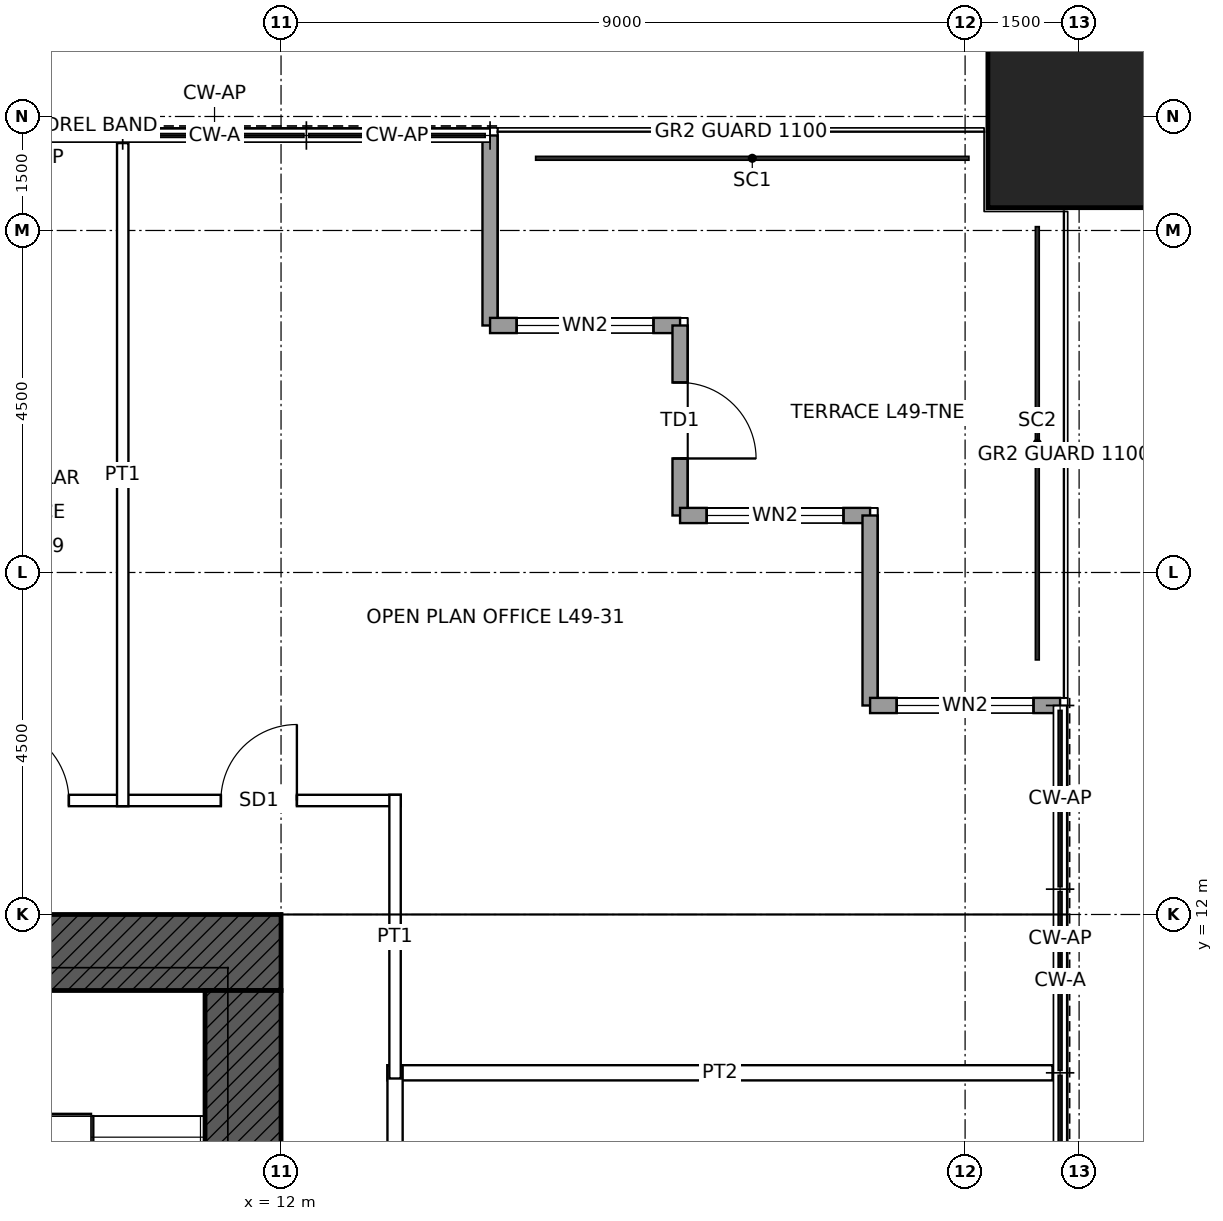
"""IFC4 building model, lengths in metres.
Left out: names, types, materials, properties, quantities, classifications, styles, units other than length and angle.
Written with IfcOpenShell. Run it as: python <this file> out.ifc"""

import sys

from ifc_helpers import new_model, si_unit, direction, frame, frame_2d, origin, origin_2d, place, context, subcontext, project, spatial, rectangle, hollow_rectangle, extrude, element, fill, save


model = new_model("IFC4")
c1 = context("Model", 3, precision=1e-05, world=origin(), true_north=direction((0.0, 1.0)))
c2 = subcontext(c1, "Body", "Model", "MODEL_VIEW")
j1 = project(units=[si_unit("LENGTHUNIT", "METRE"), si_unit("PLANEANGLEUNIT", "RADIAN")], contexts=[c1])
p1 = place(None, origin())
s1 = spatial("IfcSite", under=j1, at=p1, CompositionType="ELEMENT")
p2 = place(p1, origin())
s2 = spatial("IfcBuilding", under=s1, at=p2, CompositionType="ELEMENT")
p3 = place(p2, frame((0.0, 0.0, 229.9)))
s3 = spatial("IfcBuildingStorey", under=s2, at=p3, CompositionType="ELEMENT", Elevation=229.9)
p4 = place(p3, frame((22.5, 22.5, 0.0), z_axis=(0.0, 0.0, 1.0), x_axis=(1.0, 0.0, 0.0)))
e1 = element("IfcColumn", 1, at=p4, inside=s3, PredefinedType="COLUMN", context=c2, shape_type="SweptSolid", body=[
    extrude(hollow_rectangle(XDim=2.4, YDim=2.4, WallThickness=0.12, at=origin_2d()), origin(), (0.0, 0.0, 1.0), 4.0),
])
p5 = place(p3, frame((-12.0, 11.5, 0.0), z_axis=(0.0, 0.0, 1.0), x_axis=(1.0, 0.0, 0.0)))
e2 = element("IfcWall", 2, at=p5, inside=s3, PredefinedType="SHEAR", context=c2, shape_type="SweptSolid", body=[
    extrude(rectangle(XDim=24.0, YDim=1.0, at=frame_2d((12.0, 0.0))), origin(), (0.0, 0.0, 1.0), 4.0),
])
p6 = place(p5, frame((6.25, 0.0, 0.0)))
e3 = element("IfcOpeningElement", 3, at=p6, cuts=e2, PredefinedType="OPENING", context=c2, shape_type="SweptSolid", body=[
    extrude(rectangle(XDim=1.0, YDim=2.4, at=frame_2d((0.5, 1.2))), frame((0.0, 0.51, 0.0), z_axis=(0.0, -1.0, 0.0), x_axis=(1.0, 0.0, 0.0)), (0.0, 0.0, 1.0), 1.02),
])
p7 = place(p5, frame((16.75, 0.0, 0.0)))
e4 = element("IfcOpeningElement", 4, at=p7, cuts=e2, PredefinedType="OPENING", context=c2, shape_type="SweptSolid", body=[
    extrude(rectangle(XDim=1.0, YDim=2.4, at=frame_2d((0.5, 1.2))), frame((0.0, 0.51, 0.0), z_axis=(0.0, -1.0, 0.0), x_axis=(1.0, 0.0, 0.0)), (0.0, 0.0, 1.0), 1.02),
])
p8 = place(p3, frame((11.5, 11.0, 0.0), z_axis=(0.0, 0.0, 1.0), x_axis=(0.0, -1.0, 0.0)))
e5 = element("IfcWall", 5, at=p8, inside=s3, PredefinedType="SHEAR", context=c2, shape_type="SweptSolid", body=[
    extrude(rectangle(XDim=22.0, YDim=1.0, at=frame_2d((11.0, 0.0))), origin(), (0.0, 0.0, 1.0), 4.0),
])
p9 = place(p8, frame((10.5, 0.0, 0.0)))
e6 = element("IfcOpeningElement", 6, at=p9, cuts=e5, PredefinedType="OPENING", context=c2, shape_type="SweptSolid", body=[
    extrude(rectangle(XDim=1.0, YDim=2.4, at=frame_2d((0.5, 1.2))), frame((0.0, 0.51, 0.0), z_axis=(0.0, -1.0, 0.0), x_axis=(1.0, 0.0, 0.0)), (0.0, 0.0, 1.0), 1.02),
])
p10 = place(p3, frame((14.75, 22.25, 0.0), z_axis=(0.0, 0.0, 1.0), x_axis=(0.0, -1.0, 0.0)))
e7 = element("IfcWall", 7, at=p10, inside=s3, PredefinedType="SOLIDWALL", context=c2, shape_type="SweptSolid", body=[
    extrude(rectangle(XDim=2.5, YDim=0.2, at=frame_2d((1.25, 0.0))), origin(), (0.0, 0.0, 1.0), 3.85),
])
p11 = place(p3, frame((14.75, 19.75, 0.0), z_axis=(0.0, 0.0, 1.0), x_axis=(1.0, 0.0, 0.0)))
e8 = element("IfcWall", 8, at=p11, inside=s3, PredefinedType="SOLIDWALL", context=c2, shape_type="SweptSolid", body=[
    extrude(rectangle(XDim=2.5, YDim=0.2, at=frame_2d((1.25, 0.0))), origin(), (0.0, 0.0, 1.0), 3.85),
])
p12 = place(p11, frame((0.35, 0.0, 0.3)))
e9 = element("IfcOpeningElement", 9, at=p12, cuts=e8, PredefinedType="OPENING", context=c2, shape_type="SweptSolid", body=[
    extrude(rectangle(XDim=1.8, YDim=2.4, at=frame_2d((0.9, 1.2))), frame((0.0, 0.11, 0.0), z_axis=(0.0, -1.0, 0.0), x_axis=(1.0, 0.0, 0.0)), (0.0, 0.0, 1.0), 0.22),
])
p13 = place(p3, frame((17.25, 19.75, 0.0), z_axis=(0.0, 0.0, 1.0), x_axis=(0.0, -1.0, 0.0)))
e10 = element("IfcWall", 10, at=p13, inside=s3, PredefinedType="SOLIDWALL", context=c2, shape_type="SweptSolid", body=[
    extrude(rectangle(XDim=2.5, YDim=0.2, at=frame_2d((1.25, 0.0))), origin(), (0.0, 0.0, 1.0), 3.85),
])
p14 = place(p13, frame((0.75, 0.0, 0.0)))
e11 = element("IfcOpeningElement", 11, at=p14, cuts=e10, PredefinedType="OPENING", context=c2, shape_type="SweptSolid", body=[
    extrude(rectangle(XDim=1.0, YDim=2.4, at=frame_2d((0.5, 1.2))), frame((0.0, 0.11, 0.0), z_axis=(0.0, -1.0, 0.0), x_axis=(1.0, 0.0, 0.0)), (0.0, 0.0, 1.0), 0.22),
])
p15 = place(p3, frame((17.25, 17.25, 0.0), z_axis=(0.0, 0.0, 1.0), x_axis=(1.0, 0.0, 0.0)))
e12 = element("IfcWall", 12, at=p15, inside=s3, PredefinedType="SOLIDWALL", context=c2, shape_type="SweptSolid", body=[
    extrude(rectangle(XDim=2.5, YDim=0.2, at=frame_2d((1.25, 0.0))), origin(), (0.0, 0.0, 1.0), 3.85),
])
p16 = place(p15, frame((0.35, 0.0, 0.3)))
e13 = element("IfcOpeningElement", 13, at=p16, cuts=e12, PredefinedType="OPENING", context=c2, shape_type="SweptSolid", body=[
    extrude(rectangle(XDim=1.8, YDim=2.4, at=frame_2d((0.9, 1.2))), frame((0.0, 0.11, 0.0), z_axis=(0.0, -1.0, 0.0), x_axis=(1.0, 0.0, 0.0)), (0.0, 0.0, 1.0), 0.22),
])
p17 = place(p3, frame((19.75, 17.25, 0.0), z_axis=(0.0, 0.0, 1.0), x_axis=(0.0, -1.0, 0.0)))
e14 = element("IfcWall", 14, at=p17, inside=s3, PredefinedType="SOLIDWALL", context=c2, shape_type="SweptSolid", body=[
    extrude(rectangle(XDim=2.5, YDim=0.2, at=frame_2d((1.25, 0.0))), origin(), (0.0, 0.0, 1.0), 3.85),
])
p18 = place(p3, frame((19.75, 14.75, 0.0), z_axis=(0.0, 0.0, 1.0), x_axis=(1.0, 0.0, 0.0)))
e15 = element("IfcWall", 15, at=p18, inside=s3, PredefinedType="SOLIDWALL", context=c2, shape_type="SweptSolid", body=[
    extrude(rectangle(XDim=2.5, YDim=0.2, at=frame_2d((1.25, 0.0))), origin(), (0.0, 0.0, 1.0), 3.85),
])
p19 = place(p18, frame((0.35, 0.0, 0.3)))
e16 = element("IfcOpeningElement", 16, at=p19, cuts=e15, PredefinedType="OPENING", context=c2, shape_type="SweptSolid", body=[
    extrude(rectangle(XDim=1.8, YDim=2.4, at=frame_2d((0.9, 1.2))), frame((0.0, 0.11, 0.0), z_axis=(0.0, -1.0, 0.0), x_axis=(1.0, 0.0, 0.0)), (0.0, 0.0, 1.0), 0.22),
])
p20 = place(p3, frame((13.4, 9.917, 0.0), z_axis=(0.0, 0.0, 1.0), x_axis=(1.0, 0.0, 0.0)))
e17 = element("IfcWall", 17, at=p20, inside=s3, PredefinedType="PARTITIONING", context=c2, shape_type="SweptSolid", body=[
    extrude(rectangle(XDim=8.75, YDim=0.2, at=frame_2d((4.375, 0.0))), origin(), (0.0, 0.0, 1.0), 3.85),
])
p21 = place(p3, frame((-13.575, 13.5, 0.0), z_axis=(0.0, 0.0, 1.0), x_axis=(1.0, 0.0, 0.0)))
e18 = element("IfcWall", 18, at=p21, inside=s3, PredefinedType="PARTITIONING", context=c2, shape_type="SweptSolid", body=[
    extrude(rectangle(XDim=27.15, YDim=0.15, at=frame_2d((13.575, 0.0))), origin(), (0.0, 0.0, 1.0), 3.85),
])
p22 = place(p21, frame((4.366, 0.0, 0.0)))
e19 = element("IfcOpeningElement", 19, at=p22, cuts=e18, PredefinedType="OPENING", context=c2, shape_type="SweptSolid", body=[
    extrude(rectangle(XDim=1.0, YDim=2.1, at=frame_2d((0.5, 1.05))), frame((0.0, 0.085, 0.0), z_axis=(0.0, -1.0, 0.0), x_axis=(1.0, 0.0, 0.0)), (0.0, 0.0, 1.0), 0.17),
])
p23 = place(p21, frame((6.475, 0.0, 0.0)))
e20 = element("IfcOpeningElement", 20, at=p23, cuts=e18, PredefinedType="OPENING", context=c2, shape_type="SweptSolid", body=[
    extrude(rectangle(XDim=1.0, YDim=2.1, at=frame_2d((0.5, 1.05))), frame((0.0, 0.085, 0.0), z_axis=(0.0, -1.0, 0.0), x_axis=(1.0, 0.0, 0.0)), (0.0, 0.0, 1.0), 0.17),
])
p24 = place(p21, frame((9.465, 0.0, 0.0)))
e21 = element("IfcOpeningElement", 21, at=p24, cuts=e18, PredefinedType="OPENING", context=c2, shape_type="SweptSolid", body=[
    extrude(rectangle(XDim=1.0, YDim=2.1, at=frame_2d((0.5, 1.05))), frame((0.0, 0.085, 0.0), z_axis=(0.0, -1.0, 0.0), x_axis=(1.0, 0.0, 0.0)), (0.0, 0.0, 1.0), 0.17),
])
p25 = place(p21, frame((11.825, 0.0, 0.0)))
e22 = element("IfcOpeningElement", 22, at=p25, cuts=e18, PredefinedType="OPENING", context=c2, shape_type="SweptSolid", body=[
    extrude(rectangle(XDim=1.0, YDim=2.1, at=frame_2d((0.5, 1.05))), frame((0.0, 0.085, 0.0), z_axis=(0.0, -1.0, 0.0), x_axis=(1.0, 0.0, 0.0)), (0.0, 0.0, 1.0), 0.17),
])
p26 = place(p21, frame((14.325, 0.0, 0.0)))
e23 = element("IfcOpeningElement", 23, at=p26, cuts=e18, PredefinedType="OPENING", context=c2, shape_type="SweptSolid", body=[
    extrude(rectangle(XDim=1.0, YDim=2.1, at=frame_2d((0.5, 1.05))), frame((0.0, 0.085, 0.0), z_axis=(0.0, -1.0, 0.0), x_axis=(1.0, 0.0, 0.0)), (0.0, 0.0, 1.0), 0.17),
])
p27 = place(p21, frame((16.475, 0.0, 0.0)))
e24 = element("IfcOpeningElement", 24, at=p27, cuts=e18, PredefinedType="OPENING", context=c2, shape_type="SweptSolid", body=[
    extrude(rectangle(XDim=1.0, YDim=2.1, at=frame_2d((0.5, 1.05))), frame((0.0, 0.085, 0.0), z_axis=(0.0, -1.0, 0.0), x_axis=(1.0, 0.0, 0.0)), (0.0, 0.0, 1.0), 0.17),
])
p28 = place(p21, frame((19.675, 0.0, 0.0)))
e25 = element("IfcOpeningElement", 25, at=p28, cuts=e18, PredefinedType="OPENING", context=c2, shape_type="SweptSolid", body=[
    extrude(rectangle(XDim=1.0, YDim=2.1, at=frame_2d((0.5, 1.05))), frame((0.0, 0.085, 0.0), z_axis=(0.0, -1.0, 0.0), x_axis=(1.0, 0.0, 0.0)), (0.0, 0.0, 1.0), 0.17),
])
p29 = place(p21, frame((21.783, 0.0, 0.0)))
e26 = element("IfcOpeningElement", 26, at=p29, cuts=e18, PredefinedType="OPENING", context=c2, shape_type="SweptSolid", body=[
    extrude(rectangle(XDim=1.0, YDim=2.1, at=frame_2d((0.5, 1.05))), frame((0.0, 0.085, 0.0), z_axis=(0.0, -1.0, 0.0), x_axis=(1.0, 0.0, 0.0)), (0.0, 0.0, 1.0), 0.17),
])
p30 = place(p21, frame((24.783, 0.0, 0.0)))
e27 = element("IfcOpeningElement", 27, at=p30, cuts=e18, PredefinedType="OPENING", context=c2, shape_type="SweptSolid", body=[
    extrude(rectangle(XDim=1.0, YDim=2.4, at=frame_2d((0.5, 1.2))), frame((0.0, 0.085, 0.0), z_axis=(0.0, -1.0, 0.0), x_axis=(1.0, 0.0, 0.0)), (0.0, 0.0, 1.0), 0.17),
])
p31 = place(p21, frame((1.366, 0.0, 0.0)))
e28 = element("IfcOpeningElement", 28, at=p31, cuts=e18, PredefinedType="OPENING", context=c2, shape_type="SweptSolid", body=[
    extrude(rectangle(XDim=1.0, YDim=2.4, at=frame_2d((0.5, 1.2))), frame((0.0, 0.085, 0.0), z_axis=(0.0, -1.0, 0.0), x_axis=(1.0, 0.0, 0.0)), (0.0, 0.0, 1.0), 0.17),
])
p32 = place(p3, frame((9.917, 13.425, 0.0), z_axis=(0.0, 0.0, 1.0), x_axis=(0.0, 1.0, 0.0)))
e29 = element("IfcWall", 29, at=p32, inside=s3, PredefinedType="PARTITIONING", context=c2, shape_type="SweptSolid", body=[
    extrude(rectangle(XDim=8.725, YDim=0.15, at=frame_2d((4.362, 0.0))), origin(), (0.0, 0.0, 1.0), 3.85),
])
p33 = place(p3, frame((13.5, -5.1, 0.0), z_axis=(0.0, 0.0, 1.0), x_axis=(0.0, 1.0, 0.0)))
e30 = element("IfcWall", 30, at=p33, inside=s3, PredefinedType="PARTITIONING", context=c2, shape_type="SweptSolid", body=[
    extrude(rectangle(XDim=15.117, YDim=0.2, at=frame_2d((7.559, 0.0))), origin(), (0.0, 0.0, 1.0), 3.85),
])
p34 = place(p33, frame((12.059, 0.0, 0.0)))
e31 = element("IfcOpeningElement", 31, at=p34, cuts=e30, PredefinedType="OPENING", context=c2, shape_type="SweptSolid", body=[
    extrude(rectangle(XDim=1.0, YDim=2.1, at=frame_2d((0.5, 1.05))), frame((0.0, 0.11, 0.0), z_axis=(0.0, -1.0, 0.0), x_axis=(1.0, 0.0, 0.0)), (0.0, 0.0, 1.0), 0.22),
])
p35 = place(p33, frame((7.1, 0.0, 0.0)))
e32 = element("IfcOpeningElement", 32, at=p35, cuts=e30, PredefinedType="OPENING", context=c2, shape_type="SweptSolid", body=[
    extrude(rectangle(XDim=1.0, YDim=2.1, at=frame_2d((0.5, 1.05))), frame((0.0, 0.11, 0.0), z_axis=(0.0, -1.0, 0.0), x_axis=(1.0, 0.0, 0.0)), (0.0, 0.0, 1.0), 0.22),
])
p36 = place(p33, frame((2.1, 0.0, 0.0)))
e33 = element("IfcOpeningElement", 33, at=p36, cuts=e30, PredefinedType="OPENING", context=c2, shape_type="SweptSolid", body=[
    extrude(rectangle(XDim=1.0, YDim=2.1, at=frame_2d((0.5, 1.05))), frame((0.0, 0.11, 0.0), z_axis=(0.0, -1.0, 0.0), x_axis=(1.0, 0.0, 0.0)), (0.0, 0.0, 1.0), 0.22),
])
p37 = place(p3, frame((13.5, 9.842, 0.0), z_axis=(0.0, 0.0, 1.0), x_axis=(0.0, 1.0, 0.0)))
e34 = element("IfcWall", 34, at=p37, inside=s3, PredefinedType="PARTITIONING", context=c2, shape_type="SweptSolid", body=[
    extrude(rectangle(XDim=3.733, YDim=0.15, at=frame_2d((1.866, 0.0))), origin(), (0.0, 0.0, 1.0), 3.85),
])
p38 = place(p12, origin())
e35 = element("IfcWindow", 35, at=p38, inside=s3, PartitioningType="SINGLE_PANEL", PredefinedType="WINDOW", context=c2, shape_type="SweptSolid", body=[
    extrude(rectangle(XDim=1.8, YDim=2.4, at=frame_2d((0.9, 1.2))), frame((0.0, 0.03, 0.0), z_axis=(0.0, -1.0, 0.0), x_axis=(1.0, 0.0, 0.0)), (0.0, 0.0, 1.0), 0.06),
])
fill(e9, e35)
p39 = place(p14, origin())
e36 = element("IfcDoor", 36, at=p39, inside=s3, OperationType="SINGLE_SWING_RIGHT", PredefinedType="DOOR", context=c2, shape_type="SweptSolid", body=[
    extrude(rectangle(XDim=1.0, YDim=2.4, at=frame_2d((0.5, 1.2))), frame((0.0, 0.025, 0.0), z_axis=(0.0, -1.0, 0.0), x_axis=(1.0, 0.0, 0.0)), (0.0, 0.0, 1.0), 0.05),
])
fill(e11, e36)
p40 = place(p16, origin())
e37 = element("IfcWindow", 37, at=p40, inside=s3, PartitioningType="SINGLE_PANEL", PredefinedType="WINDOW", context=c2, shape_type="SweptSolid", body=[
    extrude(rectangle(XDim=1.8, YDim=2.4, at=frame_2d((0.9, 1.2))), frame((0.0, 0.03, 0.0), z_axis=(0.0, -1.0, 0.0), x_axis=(1.0, 0.0, 0.0)), (0.0, 0.0, 1.0), 0.06),
])
fill(e13, e37)
p41 = place(p19, origin())
e38 = element("IfcWindow", 38, at=p41, inside=s3, PartitioningType="SINGLE_PANEL", PredefinedType="WINDOW", context=c2, shape_type="SweptSolid", body=[
    extrude(rectangle(XDim=1.8, YDim=2.4, at=frame_2d((0.9, 1.2))), frame((0.0, 0.03, 0.0), z_axis=(0.0, -1.0, 0.0), x_axis=(1.0, 0.0, 0.0)), (0.0, 0.0, 1.0), 0.06),
])
fill(e16, e38)
p42 = place(p29, origin())
e39 = element("IfcDoor", 39, at=p42, inside=s3, OperationType="SINGLE_SWING_LEFT", PredefinedType="DOOR", context=c2, shape_type="SweptSolid", body=[
    extrude(rectangle(XDim=1.0, YDim=2.1, at=frame_2d((0.5, 1.05))), frame((0.0, 0.025, 0.0), z_axis=(0.0, -1.0, 0.0), x_axis=(1.0, 0.0, 0.0)), (0.0, 0.0, 1.0), 0.05),
])
fill(e26, e39)
p43 = place(p30, origin())
e40 = element("IfcDoor", 40, at=p43, inside=s3, OperationType="SINGLE_SWING_RIGHT", PredefinedType="DOOR", context=c2, shape_type="SweptSolid", body=[
    extrude(rectangle(XDim=1.0, YDim=2.4, at=frame_2d((0.5, 1.2))), frame((0.0, 0.025, 0.0), z_axis=(0.0, -1.0, 0.0), x_axis=(1.0, 0.0, 0.0)), (0.0, 0.0, 1.0), 0.05),
])
fill(e27, e40)
save(model, sys.argv[1])
